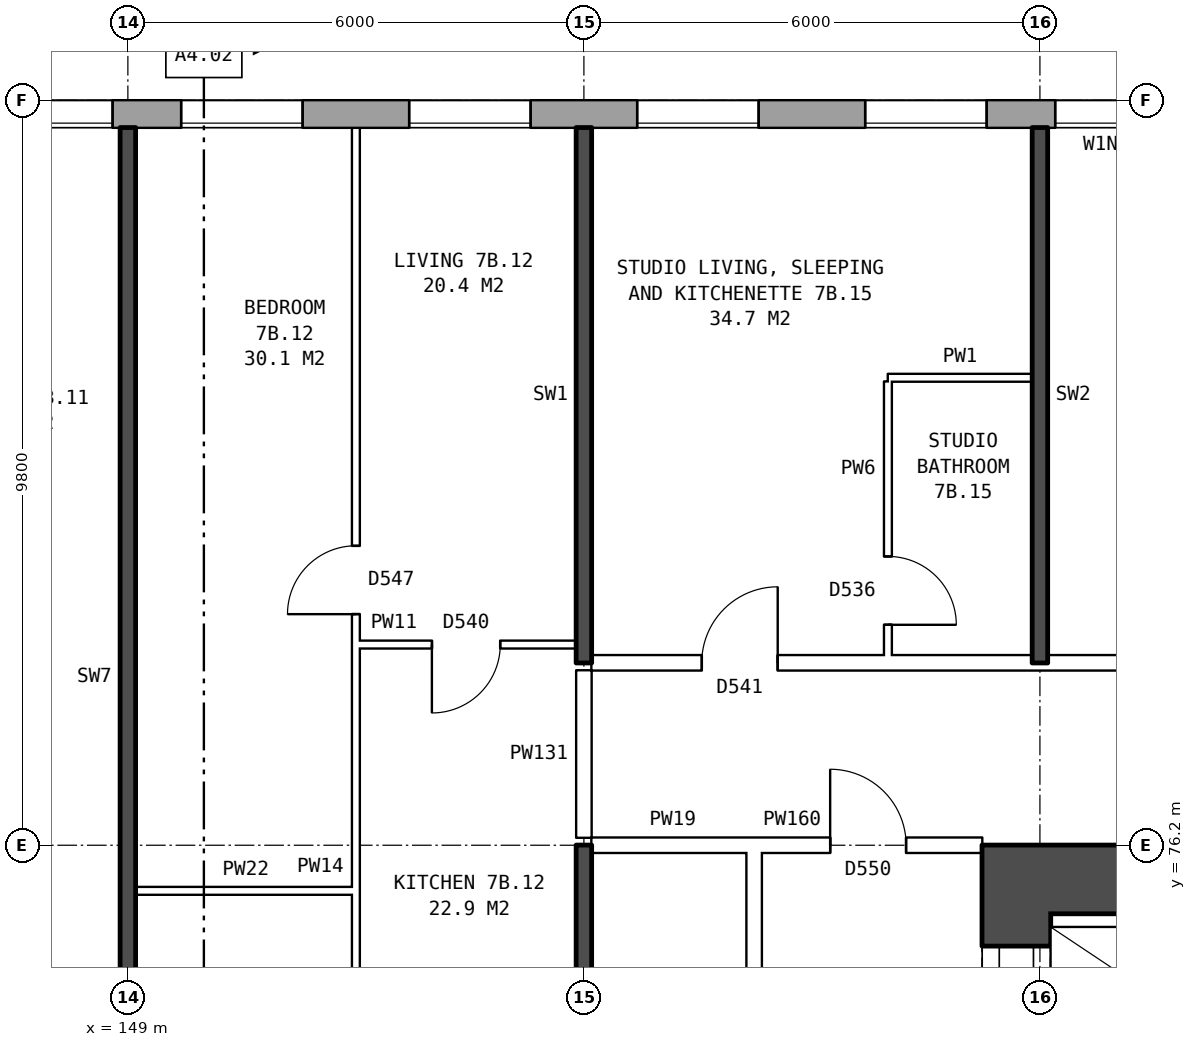
"""IFC4 building model, lengths in metres.
Left out: names, types, materials, properties, quantities, classifications, styles, units other than length and angle.
Written with IfcOpenShell. Run it as: python <this file> out.ifc"""

import sys

from ifc_helpers import new_model, si_unit, direction, frame, frame_2d, origin, place, context, subcontext, project, spatial, rectangle, extrude, element, fill, save


model = new_model("IFC4")
c1 = context("Model", 3, precision=1e-05, world=origin(), true_north=direction((0.0, 1.0)))
c2 = subcontext(c1, "Body", "Model", "MODEL_VIEW")
j1 = project(units=[si_unit("LENGTHUNIT", "METRE"), si_unit("PLANEANGLEUNIT", "RADIAN")], contexts=[c1])
p1 = place(None, origin())
s1 = spatial("IfcSite", under=j1, at=p1, CompositionType="ELEMENT")
p2 = place(p1, origin())
s2 = spatial("IfcBuilding", under=s1, at=p2, CompositionType="ELEMENT")
p3 = place(p2, frame((0.0, 0.0, 28.8)))
s3 = spatial("IfcBuildingStorey", under=s2, at=p3, CompositionType="ELEMENT", Elevation=28.8)
p4 = place(p3, frame((174.675, 85.82, 0.0), z_axis=(0.0, 0.0, 1.0), x_axis=(-1.0, 0.0, 0.0)))
e1 = element("IfcWall", 1, at=p4, inside=s3, PredefinedType="STANDARD", context=c2, shape_type="SweptSolid", body=[
    extrude(rectangle(XDim=40.601, YDim=0.36, at=frame_2d((20.3, 0.0))), origin(), (0.0, 0.0, 1.0), 2.85),
])
p5 = place(p4, frame((2.375, 0.0, 0.8)))
e2 = element("IfcOpeningElement", 2, at=p5, cuts=e1, PredefinedType="OPENING", context=c2, shape_type="SweptSolid", body=[
    extrude(rectangle(XDim=1.6, YDim=1.8, at=frame_2d((0.8, 0.9))), frame((0.0, 0.19, 0.0), z_axis=(0.0, -1.0, 0.0), x_axis=(1.0, 0.0, 0.0)), (0.0, 0.0, 1.0), 0.38),
])
p6 = place(p4, frame((5.375, 0.0, 0.8)))
e3 = element("IfcOpeningElement", 3, at=p6, cuts=e1, PredefinedType="OPENING", context=c2, shape_type="SweptSolid", body=[
    extrude(rectangle(XDim=1.6, YDim=1.8, at=frame_2d((0.8, 0.9))), frame((0.0, 0.19, 0.0), z_axis=(0.0, -1.0, 0.0), x_axis=(1.0, 0.0, 0.0)), (0.0, 0.0, 1.0), 0.38),
])
p7 = place(p4, frame((7.875, 0.0, 0.8)))
e4 = element("IfcOpeningElement", 4, at=p7, cuts=e1, PredefinedType="OPENING", context=c2, shape_type="SweptSolid", body=[
    extrude(rectangle(XDim=1.6, YDim=1.8, at=frame_2d((0.8, 0.9))), frame((0.0, 0.19, 0.0), z_axis=(0.0, -1.0, 0.0), x_axis=(1.0, 0.0, 0.0)), (0.0, 0.0, 1.0), 0.38),
])
p8 = place(p4, frame((9.775, 0.0, 1.7)))
e5 = element("IfcOpeningElement", 5, at=p8, cuts=e1, PredefinedType="OPENING", context=c2, shape_type="SweptSolid", body=[
    extrude(rectangle(XDim=0.8, YDim=0.9, at=frame_2d((0.4, 0.45))), frame((0.0, 0.19, 0.0), z_axis=(0.0, -1.0, 0.0), x_axis=(1.0, 0.0, 0.0)), (0.0, 0.0, 1.0), 0.38),
])
p9 = place(p4, frame((14.375, 0.0, 0.8)))
e6 = element("IfcOpeningElement", 6, at=p9, cuts=e1, PredefinedType="OPENING", context=c2, shape_type="SweptSolid", body=[
    extrude(rectangle(XDim=1.6, YDim=1.8, at=frame_2d((0.8, 0.9))), frame((0.0, 0.19, 0.0), z_axis=(0.0, -1.0, 0.0), x_axis=(1.0, 0.0, 0.0)), (0.0, 0.0, 1.0), 0.38),
])
p10 = place(p4, frame((17.375, 0.0, 0.8)))
e7 = element("IfcOpeningElement", 7, at=p10, cuts=e1, PredefinedType="OPENING", context=c2, shape_type="SweptSolid", body=[
    extrude(rectangle(XDim=1.6, YDim=1.8, at=frame_2d((0.8, 0.9))), frame((0.0, 0.19, 0.0), z_axis=(0.0, -1.0, 0.0), x_axis=(1.0, 0.0, 0.0)), (0.0, 0.0, 1.0), 0.38),
])
p11 = place(p4, frame((20.375, 0.0, 0.8)))
e8 = element("IfcOpeningElement", 8, at=p11, cuts=e1, PredefinedType="OPENING", context=c2, shape_type="SweptSolid", body=[
    extrude(rectangle(XDim=1.6, YDim=1.8, at=frame_2d((0.8, 0.9))), frame((0.0, 0.19, 0.0), z_axis=(0.0, -1.0, 0.0), x_axis=(1.0, 0.0, 0.0)), (0.0, 0.0, 1.0), 0.38),
])
p12 = place(p4, frame((23.375, 0.0, 0.8)))
e9 = element("IfcOpeningElement", 9, at=p12, cuts=e1, PredefinedType="OPENING", context=c2, shape_type="SweptSolid", body=[
    extrude(rectangle(XDim=1.6, YDim=1.8, at=frame_2d((0.8, 0.9))), frame((0.0, 0.19, 0.0), z_axis=(0.0, -1.0, 0.0), x_axis=(1.0, 0.0, 0.0)), (0.0, 0.0, 1.0), 0.38),
])
p13 = place(p4, frame((25.875, 0.0, 0.8)))
e10 = element("IfcOpeningElement", 10, at=p13, cuts=e1, PredefinedType="OPENING", context=c2, shape_type="SweptSolid", body=[
    extrude(rectangle(XDim=1.6, YDim=1.8, at=frame_2d((0.8, 0.9))), frame((0.0, 0.19, 0.0), z_axis=(0.0, -1.0, 0.0), x_axis=(1.0, 0.0, 0.0)), (0.0, 0.0, 1.0), 0.38),
])
p14 = place(p4, frame((28.825, 0.0, 0.15)))
e11 = element("IfcOpeningElement", 11, at=p14, cuts=e1, PredefinedType="OPENING", context=c2, shape_type="SweptSolid", body=[
    extrude(rectangle(XDim=0.6, YDim=0.9, at=frame_2d((0.3, 0.45))), frame((0.0, 0.19, 0.0), z_axis=(0.0, -1.0, 0.0), x_axis=(1.0, 0.0, 0.0)), (0.0, 0.0, 1.0), 0.38),
])
p15 = place(p4, frame((32.375, 0.0, 0.8)))
e12 = element("IfcOpeningElement", 12, at=p15, cuts=e1, PredefinedType="OPENING", context=c2, shape_type="SweptSolid", body=[
    extrude(rectangle(XDim=1.6, YDim=1.8, at=frame_2d((0.8, 0.9))), frame((0.0, 0.19, 0.0), z_axis=(0.0, -1.0, 0.0), x_axis=(1.0, 0.0, 0.0)), (0.0, 0.0, 1.0), 0.38),
])
p16 = place(p4, frame((35.375, 0.0, 0.8)))
e13 = element("IfcOpeningElement", 13, at=p16, cuts=e1, PredefinedType="OPENING", context=c2, shape_type="SweptSolid", body=[
    extrude(rectangle(XDim=1.6, YDim=1.8, at=frame_2d((0.8, 0.9))), frame((0.0, 0.19, 0.0), z_axis=(0.0, -1.0, 0.0), x_axis=(1.0, 0.0, 0.0)), (0.0, 0.0, 1.0), 0.38),
])
p17 = place(p4, frame((38.375, 0.0, 0.8)))
e14 = element("IfcOpeningElement", 14, at=p17, cuts=e1, PredefinedType="OPENING", context=c2, shape_type="SweptSolid", body=[
    extrude(rectangle(XDim=1.6, YDim=1.8, at=frame_2d((0.8, 0.9))), frame((0.0, 0.19, 0.0), z_axis=(0.0, -1.0, 0.0), x_axis=(1.0, 0.0, 0.0)), (0.0, 0.0, 1.0), 0.38),
])
p18 = place(p4, frame((12.275, 0.0, 0.8)))
e15 = element("IfcOpeningElement", 15, at=p18, cuts=e1, PredefinedType="OPENING", context=c2, shape_type="SweptSolid", body=[
    extrude(rectangle(XDim=1.2, YDim=1.2, at=frame_2d((0.6, 0.6))), frame((0.0, 0.19, 0.0), z_axis=(0.0, -1.0, 0.0), x_axis=(1.0, 0.0, 0.0)), (0.0, 0.0, 1.0), 0.38),
])
p19 = place(p4, frame((27.775, 0.0, 0.8)))
e16 = element("IfcOpeningElement", 16, at=p19, cuts=e1, PredefinedType="OPENING", context=c2, shape_type="SweptSolid", body=[
    extrude(rectangle(XDim=0.6, YDim=0.9, at=frame_2d((0.3, 0.45))), frame((0.0, 0.19, 0.0), z_axis=(0.0, -1.0, 0.0), x_axis=(1.0, 0.0, 0.0)), (0.0, 0.0, 1.0), 0.38),
])
p20 = place(p4, frame((30.025, 0.0, 1.65)))
e17 = element("IfcOpeningElement", 17, at=p20, cuts=e1, PredefinedType="OPENING", context=c2, shape_type="SweptSolid", body=[
    extrude(rectangle(XDim=1.4, YDim=0.9, at=frame_2d((0.7, 0.45))), frame((0.0, 0.19, 0.0), z_axis=(0.0, -1.0, 0.0), x_axis=(1.0, 0.0, 0.0)), (0.0, 0.0, 1.0), 0.38),
])
p21 = place(p3, frame((160.69, 75.3, 0.0), z_axis=(0.0, 0.0, 1.0), x_axis=(0.0, -1.0, 0.0)))
e18 = element("IfcWall", 18, at=p21, inside=s3, PredefinedType="SHEAR", context=c2, shape_type="SweptSolid", body=[
    extrude(rectangle(XDim=10.6, YDim=0.9, at=frame_2d((5.3, 0.0))), origin(), (0.0, 0.0, 1.0), 2.85),
])
p22 = place(p21, frame((0.425, 0.0, 0.0)))
e19 = element("IfcOpeningElement", 19, at=p22, cuts=e18, PredefinedType="OPENING", context=c2, shape_type="SweptSolid", body=[
    extrude(rectangle(XDim=1.1, YDim=2.1, at=frame_2d((0.55, 1.05))), frame((0.0, 0.46, 0.0), z_axis=(0.0, -1.0, 0.0), x_axis=(1.0, 0.0, 0.0)), (0.0, 0.0, 1.0), 0.92),
])
p23 = place(p21, frame((2.7, 0.0, 0.0)))
e20 = element("IfcOpeningElement", 20, at=p23, cuts=e18, PredefinedType="OPENING", context=c2, shape_type="SweptSolid", body=[
    extrude(rectangle(XDim=1.1, YDim=2.1, at=frame_2d((0.55, 1.05))), frame((0.0, 0.46, 0.0), z_axis=(0.0, -1.0, 0.0), x_axis=(1.0, 0.0, 0.0)), (0.0, 0.0, 1.0), 0.92),
])
p24 = place(p21, frame((4.9, 0.0, 0.0)))
e21 = element("IfcOpeningElement", 21, at=p24, cuts=e18, PredefinedType="OPENING", context=c2, shape_type="SweptSolid", body=[
    extrude(rectangle(XDim=1.1, YDim=2.1, at=frame_2d((0.55, 1.05))), frame((0.0, 0.46, 0.0), z_axis=(0.0, -1.0, 0.0), x_axis=(1.0, 0.0, 0.0)), (0.0, 0.0, 1.0), 0.92),
])
p25 = place(p21, frame((9.0, 0.0, 0.0)))
e22 = element("IfcOpeningElement", 22, at=p25, cuts=e18, PredefinedType="OPENING", context=c2, shape_type="SweptSolid", body=[
    extrude(rectangle(XDim=1.1, YDim=2.1, at=frame_2d((0.55, 1.05))), frame((0.0, 0.46, 0.0), z_axis=(0.0, -1.0, 0.0), x_axis=(1.0, 0.0, 0.0)), (0.0, 0.0, 1.0), 0.92),
])
p26 = place(p21, frame((7.225, 0.0, 0.0)))
e23 = element("IfcOpeningElement", 23, at=p26, cuts=e18, PredefinedType="OPENING", context=c2, shape_type="SweptSolid", body=[
    extrude(rectangle(XDim=0.85, YDim=2.1, at=frame_2d((0.425, 1.05))), frame((0.0, 0.46, 0.0), z_axis=(0.0, -1.0, 0.0), x_axis=(1.0, 0.0, 0.0)), (0.0, 0.0, 1.0), 0.92),
])
p27 = place(p3, frame((160.24, 75.75, 0.0), z_axis=(0.0, 0.0, 1.0), x_axis=(1.0, 0.0, 0.0)))
e24 = element("IfcWall", 24, at=p27, inside=s3, PredefinedType="SHEAR", context=c2, shape_type="SweptSolid", body=[
    extrude(rectangle(XDim=8.4, YDim=0.9, at=frame_2d((4.2, 0.0))), origin(), (0.0, 0.0, 1.0), 2.85),
])
p28 = place(p3, frame((157.24, 63.9, 0.0), z_axis=(0.0, 0.0, 1.0), x_axis=(0.0, 1.0, 0.0)))
e25 = element("IfcWall", 25, at=p28, inside=s3, PredefinedType="PARTITIONING", context=c2, shape_type="SweptSolid", body=[
    extrude(rectangle(XDim=12.2, YDim=0.2, at=frame_2d((6.1, 0.0))), origin(), (0.0, 0.0, 1.0), 2.85),
])
p29 = place(p28, frame((5.1, 0.0, 0.0)))
e26 = element("IfcOpeningElement", 26, at=p29, cuts=e25, PredefinedType="OPENING", context=c2, shape_type="SweptSolid", body=[
    extrude(rectangle(XDim=2.0, YDim=2.1, at=frame_2d((1.0, 1.05))), frame((0.0, 0.11, 0.0), z_axis=(0.0, -1.0, 0.0), x_axis=(1.0, 0.0, 0.0)), (0.0, 0.0, 1.0), 0.22),
])
p30 = place(p3, frame((149.1, 75.6, 0.0), z_axis=(0.0, 0.0, 1.0), x_axis=(1.0, 0.0, 0.0)))
e27 = element("IfcWall", 27, at=p30, inside=s3, PredefinedType="PARTITIONING", context=c2, shape_type="SweptSolid", body=[
    extrude(rectangle(XDim=2.9, YDim=0.1, at=frame_2d((1.45, 0.0))), origin(), (0.0, 0.0, 1.0), 2.85),
])
p31 = place(p3, frame((155.1, 76.2, 0.0), z_axis=(0.0, 0.0, 1.0), x_axis=(1.0, 0.0, 0.0)))
e28 = element("IfcWall", 28, at=p31, inside=s3, PredefinedType="PARTITIONING", context=c2, shape_type="SweptSolid", body=[
    extrude(rectangle(XDim=2.14, YDim=0.2, at=frame_2d((1.07, 0.0))), origin(), (0.0, 0.0, 1.0), 2.85),
])
p32 = place(p3, frame((157.24, 76.2, 0.0), z_axis=(0.0, 0.0, 1.0), x_axis=(1.0, 0.0, 0.0)))
e29 = element("IfcWall", 29, at=p32, inside=s3, PredefinedType="PARTITIONING", context=c2, shape_type="SweptSolid", body=[
    extrude(rectangle(XDim=3.0, YDim=0.2, at=frame_2d((1.5, 0.0))), origin(), (0.0, 0.0, 1.0), 2.85),
])
p33 = place(p32, frame((1.0, 0.0, 0.0)))
e30 = element("IfcOpeningElement", 30, at=p33, cuts=e29, PredefinedType="OPENING", context=c2, shape_type="SweptSolid", body=[
    extrude(rectangle(XDim=1.0, YDim=2.1, at=frame_2d((0.5, 1.05))), frame((0.0, 0.11, 0.0), z_axis=(0.0, -1.0, 0.0), x_axis=(1.0, 0.0, 0.0)), (0.0, 0.0, 1.0), 0.22),
])
p34 = place(p3, frame((155.1, 78.6, 0.0), z_axis=(0.0, 0.0, 1.0), x_axis=(1.0, 0.0, 0.0)))
e31 = element("IfcWall", 31, at=p34, inside=s3, PredefinedType="PARTITIONING", context=c2, shape_type="SweptSolid", body=[
    extrude(rectangle(XDim=22.29, YDim=0.2, at=frame_2d((11.145, 0.0))), origin(), (0.0, 0.0, 1.0), 2.85),
])
p35 = place(p34, frame((1.45, 0.0, 0.0)))
e32 = element("IfcOpeningElement", 32, at=p35, cuts=e31, PredefinedType="OPENING", context=c2, shape_type="SweptSolid", body=[
    extrude(rectangle(XDim=1.0, YDim=2.1, at=frame_2d((0.5, 1.05))), frame((0.0, 0.11, 0.0), z_axis=(0.0, -1.0, 0.0), x_axis=(1.0, 0.0, 0.0)), (0.0, 0.0, 1.0), 0.22),
])
p36 = place(p34, frame((7.4, 0.0, 0.0)))
e33 = element("IfcOpeningElement", 33, at=p36, cuts=e31, PredefinedType="OPENING", context=c2, shape_type="SweptSolid", body=[
    extrude(rectangle(XDim=1.0, YDim=2.1, at=frame_2d((0.5, 1.05))), frame((0.0, 0.11, 0.0), z_axis=(0.0, -1.0, 0.0), x_axis=(1.0, 0.0, 0.0)), (0.0, 0.0, 1.0), 0.22),
])
p37 = place(p34, frame((14.4, 0.0, 0.0)))
e34 = element("IfcOpeningElement", 34, at=p37, cuts=e31, PredefinedType="OPENING", context=c2, shape_type="SweptSolid", body=[
    extrude(rectangle(XDim=1.0, YDim=2.1, at=frame_2d((0.5, 1.05))), frame((0.0, 0.11, 0.0), z_axis=(0.0, -1.0, 0.0), x_axis=(1.0, 0.0, 0.0)), (0.0, 0.0, 1.0), 0.22),
])
p38 = place(p3, frame((152.0, 78.84, 0.0), z_axis=(0.0, 0.0, 1.0), x_axis=(1.0, 0.0, 0.0)))
e35 = element("IfcWall", 35, at=p38, inside=s3, PredefinedType="PARTITIONING", context=c2, shape_type="SweptSolid", body=[
    extrude(rectangle(XDim=2.9, YDim=0.1, at=frame_2d((1.45, 0.0))), origin(), (0.0, 0.0, 1.0), 2.85),
])
p39 = place(p38, frame((1.0, 0.0, 0.0)))
e36 = element("IfcOpeningElement", 36, at=p39, cuts=e35, PredefinedType="OPENING", context=c2, shape_type="SweptSolid", body=[
    extrude(rectangle(XDim=0.9, YDim=2.1, at=frame_2d((0.45, 1.05))), frame((0.0, 0.06, 0.0), z_axis=(0.0, -1.0, 0.0), x_axis=(1.0, 0.0, 0.0)), (0.0, 0.0, 1.0), 0.12),
])
p40 = place(p3, frame((159.0, 82.35, 0.0), z_axis=(0.0, 0.0, 1.0), x_axis=(1.0, 0.0, 0.0)))
e37 = element("IfcWall", 37, at=p40, inside=s3, PredefinedType="PARTITIONING", context=c2, shape_type="SweptSolid", body=[
    extrude(rectangle(XDim=1.9, YDim=0.1, at=frame_2d((0.95, 0.0))), origin(), (0.0, 0.0, 1.0), 2.85),
])
p41 = place(p3, frame((149.0, 71.2, 0.0), z_axis=(0.0, 0.0, 1.0), x_axis=(0.0, 1.0, 0.0)))
e38 = element("IfcWall", 38, at=p41, inside=s3, PredefinedType="SOLIDWALL", context=c2, shape_type="SweptSolid", body=[
    extrude(rectangle(XDim=14.44, YDim=0.2, at=frame_2d((7.22, 0.0))), origin(), (0.0, 0.0, 1.0), 2.85),
])
p42 = place(p3, frame((152.0, 71.3, 0.0), z_axis=(0.0, 0.0, 1.0), x_axis=(0.0, 1.0, 0.0)))
e39 = element("IfcWall", 39, at=p42, inside=s3, PredefinedType="PARTITIONING", context=c2, shape_type="SweptSolid", body=[
    extrude(rectangle(XDim=14.34, YDim=0.1, at=frame_2d((7.17, 0.0))), origin(), (0.0, 0.0, 1.0), 2.85),
])
p43 = place(p42, frame((7.94, 0.0, 0.0)))
e40 = element("IfcOpeningElement", 40, at=p43, cuts=e39, PredefinedType="OPENING", context=c2, shape_type="SweptSolid", body=[
    extrude(rectangle(XDim=0.9, YDim=2.1, at=frame_2d((0.45, 1.05))), frame((0.0, 0.06, 0.0), z_axis=(0.0, -1.0, 0.0), x_axis=(1.0, 0.0, 0.0)), (0.0, 0.0, 1.0), 0.12),
])
p44 = place(p42, frame((0.4, 0.0, 0.0)))
e41 = element("IfcOpeningElement", 41, at=p44, cuts=e39, PredefinedType="OPENING", context=c2, shape_type="SweptSolid", body=[
    extrude(rectangle(XDim=0.9, YDim=2.1, at=frame_2d((0.45, 1.05))), frame((0.0, 0.06, 0.0), z_axis=(0.0, -1.0, 0.0), x_axis=(1.0, 0.0, 0.0)), (0.0, 0.0, 1.0), 0.12),
])
p45 = place(p3, frame((155.0, 71.2, 0.0), z_axis=(0.0, 0.0, 1.0), x_axis=(0.0, 1.0, 0.0)))
e42 = element("IfcWall", 42, at=p45, inside=s3, PredefinedType="SOLIDWALL", context=c2, shape_type="SweptSolid", body=[
    extrude(rectangle(XDim=5.0, YDim=0.2, at=frame_2d((2.5, 0.0))), origin(), (0.0, 0.0, 1.0), 2.85),
])
p46 = place(p3, frame((155.0, 76.3, 0.0), z_axis=(0.0, 0.0, 1.0), x_axis=(0.0, 1.0, 0.0)))
e43 = element("IfcWall", 43, at=p46, inside=s3, PredefinedType="PARTITIONING", context=c2, shape_type="SweptSolid", body=[
    extrude(rectangle(XDim=2.2, YDim=0.2, at=frame_2d((1.1, 0.0))), origin(), (0.0, 0.0, 1.0), 2.85),
])
p47 = place(p3, frame((155.0, 78.6, 0.0), z_axis=(0.0, 0.0, 1.0), x_axis=(0.0, 1.0, 0.0)))
e44 = element("IfcWall", 44, at=p47, inside=s3, PredefinedType="SOLIDWALL", context=c2, shape_type="SweptSolid", body=[
    extrude(rectangle(XDim=7.04, YDim=0.2, at=frame_2d((3.52, 0.0))), origin(), (0.0, 0.0, 1.0), 2.85),
])
p48 = place(p3, frame((159.0, 78.7, 0.0), z_axis=(0.0, 0.0, 1.0), x_axis=(0.0, 1.0, 0.0)))
e45 = element("IfcWall", 45, at=p48, inside=s3, PredefinedType="PARTITIONING", context=c2, shape_type="SweptSolid", body=[
    extrude(rectangle(XDim=3.6, YDim=0.1, at=frame_2d((1.8, 0.0))), origin(), (0.0, 0.0, 1.0), 2.85),
])
p49 = place(p48, frame((0.4, 0.0, 0.0)))
e46 = element("IfcOpeningElement", 46, at=p49, cuts=e45, PredefinedType="OPENING", context=c2, shape_type="SweptSolid", body=[
    extrude(rectangle(XDim=0.9, YDim=2.1, at=frame_2d((0.45, 1.05))), frame((0.0, 0.06, 0.0), z_axis=(0.0, -1.0, 0.0), x_axis=(1.0, 0.0, 0.0)), (0.0, 0.0, 1.0), 0.12),
])
p50 = place(p3, frame((161.0, 78.6, 0.0), z_axis=(0.0, 0.0, 1.0), x_axis=(0.0, 1.0, 0.0)))
e47 = element("IfcWall", 47, at=p50, inside=s3, PredefinedType="SOLIDWALL", context=c2, shape_type="SweptSolid", body=[
    extrude(rectangle(XDim=7.04, YDim=0.2, at=frame_2d((3.52, 0.0))), origin(), (0.0, 0.0, 1.0), 2.85),
])
p51 = place(p9, origin())
e48 = element("IfcWindow", 48, at=p51, inside=s3, PartitioningType="SINGLE_PANEL", PredefinedType="WINDOW", context=c2, shape_type="SweptSolid", body=[
    extrude(rectangle(XDim=1.6, YDim=1.8, at=frame_2d((0.8, 0.9))), frame((0.0, 0.15, 0.0), z_axis=(0.0, -1.0, 0.0), x_axis=(1.0, 0.0, 0.0)), (0.0, 0.0, 1.0), 0.06),
])
fill(e6, e48)
p52 = place(p10, origin())
e49 = element("IfcWindow", 49, at=p52, inside=s3, PartitioningType="SINGLE_PANEL", PredefinedType="WINDOW", context=c2, shape_type="SweptSolid", body=[
    extrude(rectangle(XDim=1.6, YDim=1.8, at=frame_2d((0.8, 0.9))), frame((0.0, 0.15, 0.0), z_axis=(0.0, -1.0, 0.0), x_axis=(1.0, 0.0, 0.0)), (0.0, 0.0, 1.0), 0.06),
])
fill(e7, e49)
p53 = place(p11, origin())
e50 = element("IfcWindow", 50, at=p53, inside=s3, PartitioningType="SINGLE_PANEL", PredefinedType="WINDOW", context=c2, shape_type="SweptSolid", body=[
    extrude(rectangle(XDim=1.6, YDim=1.8, at=frame_2d((0.8, 0.9))), frame((0.0, 0.15, 0.0), z_axis=(0.0, -1.0, 0.0), x_axis=(1.0, 0.0, 0.0)), (0.0, 0.0, 1.0), 0.06),
])
fill(e8, e50)
p54 = place(p12, origin())
e51 = element("IfcWindow", 51, at=p54, inside=s3, PartitioningType="SINGLE_PANEL", PredefinedType="WINDOW", context=c2, shape_type="SweptSolid", body=[
    extrude(rectangle(XDim=1.6, YDim=1.8, at=frame_2d((0.8, 0.9))), frame((0.0, 0.15, 0.0), z_axis=(0.0, -1.0, 0.0), x_axis=(1.0, 0.0, 0.0)), (0.0, 0.0, 1.0), 0.06),
])
fill(e9, e51)
p55 = place(p13, origin())
e52 = element("IfcWindow", 52, at=p55, inside=s3, PartitioningType="SINGLE_PANEL", PredefinedType="WINDOW", context=c2, shape_type="SweptSolid", body=[
    extrude(rectangle(XDim=1.6, YDim=1.8, at=frame_2d((0.8, 0.9))), frame((0.0, 0.15, 0.0), z_axis=(0.0, -1.0, 0.0), x_axis=(1.0, 0.0, 0.0)), (0.0, 0.0, 1.0), 0.06),
])
fill(e10, e52)
p56 = place(p22, origin())
e53 = element("IfcDoor", 53, at=p56, inside=s3, OperationType="DOUBLE_DOOR_SLIDING", PredefinedType="DOOR", context=c2, shape_type="SweptSolid", body=[
    extrude(rectangle(XDim=1.1, YDim=2.1, at=frame_2d((0.55, 1.05))), frame((0.0, 0.435, 0.0), z_axis=(0.0, -1.0, 0.0), x_axis=(1.0, 0.0, 0.0)), (0.0, 0.0, 1.0), 0.05),
])
fill(e19, e53)
p57 = place(p33, origin())
e54 = element("IfcDoor", 54, at=p57, inside=s3, OperationType="SINGLE_SWING_LEFT", PredefinedType="DOOR", context=c2, shape_type="SweptSolid", body=[
    extrude(rectangle(XDim=1.0, YDim=2.1, at=frame_2d((0.5, 1.05))), frame((0.0, 0.025, 0.0), z_axis=(0.0, -1.0, 0.0), x_axis=(1.0, 0.0, 0.0)), (0.0, 0.0, 1.0), 0.05),
])
fill(e30, e54)
p58 = place(p43, origin())
e55 = element("IfcDoor", 55, at=p58, inside=s3, OperationType="SINGLE_SWING_LEFT", PredefinedType="DOOR", context=c2, shape_type="SweptSolid", body=[
    extrude(rectangle(XDim=0.9, YDim=2.1, at=frame_2d((0.45, 1.05))), frame((0.0, 0.025, 0.0), z_axis=(0.0, -1.0, 0.0), x_axis=(1.0, 0.0, 0.0)), (0.0, 0.0, 1.0), 0.05),
])
fill(e40, e55)
p59 = place(p39, frame((0.9, 0.0, 0.0), z_axis=(0.0, 0.0, 1.0), x_axis=(-1.0, 0.0, 0.0)))
e56 = element("IfcDoor", 56, at=p59, inside=s3, OperationType="SINGLE_SWING_RIGHT", PredefinedType="DOOR", context=c2, shape_type="SweptSolid", body=[
    extrude(rectangle(XDim=0.9, YDim=2.1, at=frame_2d((0.45, 1.05))), frame((0.0, 0.025, 0.0), z_axis=(0.0, -1.0, 0.0), x_axis=(1.0, 0.0, 0.0)), (0.0, 0.0, 1.0), 0.05),
])
fill(e36, e56)
p60 = place(p35, origin())
e57 = element("IfcDoor", 57, at=p60, inside=s3, OperationType="SINGLE_SWING_RIGHT", PredefinedType="DOOR", context=c2, shape_type="SweptSolid", body=[
    extrude(rectangle(XDim=1.0, YDim=2.1, at=frame_2d((0.5, 1.05))), frame((0.0, 0.025, 0.0), z_axis=(0.0, -1.0, 0.0), x_axis=(1.0, 0.0, 0.0)), (0.0, 0.0, 1.0), 0.05),
])
fill(e32, e57)
p61 = place(p49, frame((0.9, 0.0, 0.0), z_axis=(0.0, 0.0, 1.0), x_axis=(-1.0, 0.0, 0.0)))
e58 = element("IfcDoor", 58, at=p61, inside=s3, OperationType="SINGLE_SWING_RIGHT", PredefinedType="DOOR", context=c2, shape_type="SweptSolid", body=[
    extrude(rectangle(XDim=0.9, YDim=2.1, at=frame_2d((0.45, 1.05))), frame((0.0, 0.025, 0.0), z_axis=(0.0, -1.0, 0.0), x_axis=(1.0, 0.0, 0.0)), (0.0, 0.0, 1.0), 0.05),
])
fill(e46, e58)
p62 = place(p18, origin())
e59 = element("IfcWindow", 59, at=p62, inside=s3, PartitioningType="SINGLE_PANEL", PredefinedType="WINDOW", context=c2, shape_type="SweptSolid", body=[
    extrude(rectangle(XDim=1.2, YDim=1.2, at=frame_2d((0.6, 0.6))), frame((0.0, 0.15, 0.0), z_axis=(0.0, -1.0, 0.0), x_axis=(1.0, 0.0, 0.0)), (0.0, 0.0, 1.0), 0.06),
])
fill(e15, e59)
save(model, sys.argv[1])
